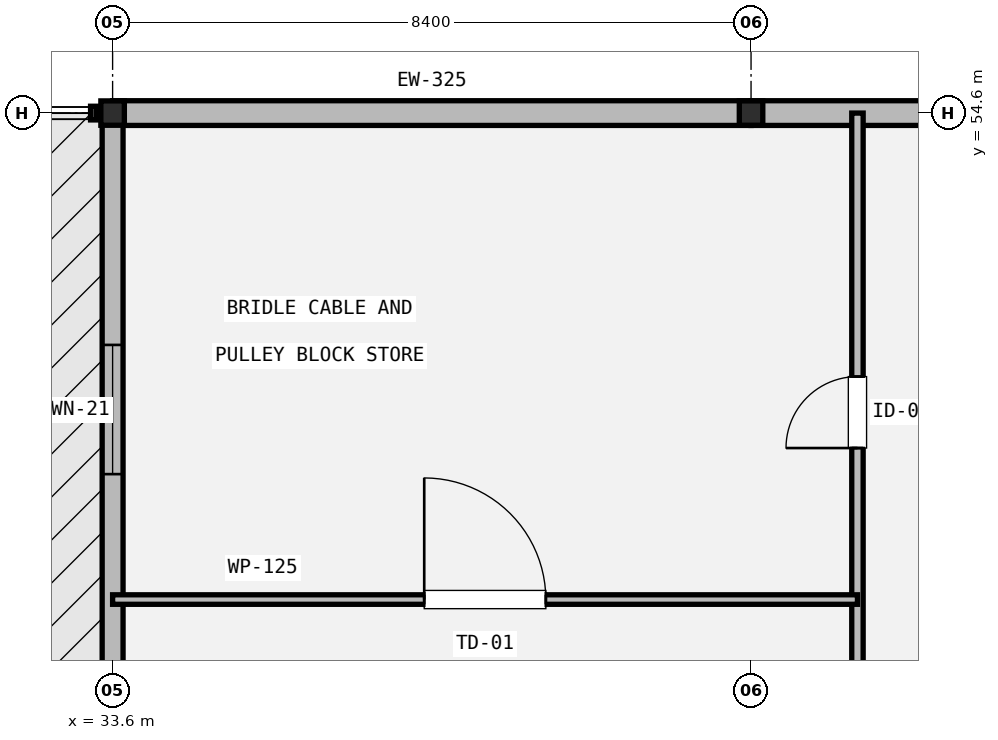
"""IFC4 building model, lengths in metres.
Left out: names, types, materials, properties, quantities, classifications, styles, units other than length and angle.
Written with IfcOpenShell. Run it as: python <this file> out.ifc"""

import sys

from ifc_helpers import new_model, si_unit, direction, frame, frame_2d, origin, origin_2d, place, context, subcontext, project, spatial, rectangle, i_section, extrude, element, fill, save


model = new_model("IFC4")
c1 = context("Model", 3, precision=1e-05, world=origin(), true_north=direction((0.0, 1.0)))
c2 = subcontext(c1, "Body", "Model", "MODEL_VIEW")
j1 = project(units=[si_unit("LENGTHUNIT", "METRE"), si_unit("PLANEANGLEUNIT", "RADIAN")], contexts=[c1])
p1 = place(None, origin())
s1 = spatial("IfcSite", under=j1, at=p1, CompositionType="ELEMENT")
p2 = place(p1, origin())
s2 = spatial("IfcBuilding", under=s1, at=p2, CompositionType="ELEMENT")
p3 = place(p2, frame((0.0, 0.0, 27.6)))
s3 = spatial("IfcBuildingStorey", under=s2, at=p3, CompositionType="ELEMENT", Elevation=27.6)
for number, where, z_axis, x_axis in (
    (1, (33.6, 54.6, 0.0), (0.0, 0.0, 1.0), (1.0, 0.0, 0.0)),
    (2, (42.0, 54.6, 0.0), (0.0, 0.0, 1.0), (1.0, 0.0, 0.0)),
):
    element("IfcColumn", number, at=place(p3, frame(where, z_axis=z_axis, x_axis=x_axis)), inside=s3, PredefinedType="COLUMN", context=c2, shape_type="SweptSolid", body=[
        extrude(i_section(OverallWidth=0.309, OverallDepth=0.321, WebThickness=0.014, FlangeThickness=0.022, FilletRadius=0.015, at=origin_2d()), origin(), (0.0, 0.0, 1.0), 4.8),
    ])
for number, where, z_axis, x_axis in (
    (3, (33.6, 54.6, 0.0), (0.0, 0.0, 1.0), (1.0, 0.0, 0.0)),
    (4, (42.0, 54.6, 0.0), (0.0, 0.0, 1.0), (1.0, 0.0, 0.0)),
):
    element("IfcWall", number, at=place(p3, frame(where, z_axis=z_axis, x_axis=x_axis)), inside=s3, PredefinedType="STANDARD", context=c2, shape_type="SweptSolid", body=[
        extrude(rectangle(XDim=8.4, YDim=0.325, at=frame_2d((4.2, 0.0))), origin(), (0.0, 0.0, 1.0), 4.552),
    ])
p4 = place(p3, frame((33.6, 39.0, 0.0), z_axis=(0.0, 0.0, 1.0), x_axis=(0.0, 1.0, 0.0)))
e5 = element("IfcWall", 5, at=p4, inside=s3, PredefinedType="STANDARD", context=c2, shape_type="SweptSolid", body=[
    extrude(rectangle(XDim=15.6, YDim=0.275, at=frame_2d((7.8, 0.0))), origin(), (0.0, 0.0, 1.0), 4.552),
])
p5 = place(p4, frame((3.125, 0.0, 0.9)))
e6 = element("IfcOpeningElement", 6, at=p5, cuts=e5, PredefinedType="OPENING", context=c2, shape_type="SweptSolid", body=[
    extrude(rectangle(XDim=1.55, YDim=1.6, at=frame_2d((0.775, 0.8))), frame((0.0, 0.147, 0.0), z_axis=(0.0, -1.0, 0.0), x_axis=(1.0, 0.0, 0.0)), (0.0, 0.0, 1.0), 0.295),
])
p6 = place(p4, frame((10.85, 0.0, 0.9)))
e7 = element("IfcOpeningElement", 7, at=p6, cuts=e5, PredefinedType="OPENING", context=c2, shape_type="SweptSolid", body=[
    extrude(rectangle(XDim=1.7, YDim=1.6, at=frame_2d((0.85, 0.8))), frame((0.0, 0.147, 0.0), z_axis=(0.0, -1.0, 0.0), x_axis=(1.0, 0.0, 0.0)), (0.0, 0.0, 1.0), 0.295),
])
p7 = place(p3, frame((43.4, 34.4, 0.0), z_axis=(0.0, 0.0, 1.0), x_axis=(0.0, 1.0, 0.0)))
e8 = element("IfcWall", 8, at=p7, inside=s3, PredefinedType="PARTITIONING", context=c2, shape_type="SweptSolid", body=[
    extrude(rectangle(XDim=20.2, YDim=0.15, at=frame_2d((10.1, 0.0))), origin(), (0.0, 0.0, 1.0), 4.552),
])
p8 = place(p7, frame((5.73, 0.0, 0.0)))
e9 = element("IfcOpeningElement", 9, at=p8, cuts=e8, PredefinedType="OPENING", context=c2, shape_type="SweptSolid", body=[
    extrude(rectangle(XDim=1.1, YDim=2.15, at=frame_2d((0.55, 1.075))), frame((0.0, 0.085, 0.0), z_axis=(0.0, -1.0, 0.0), x_axis=(1.0, 0.0, 0.0)), (0.0, 0.0, 1.0), 0.17),
])
p9 = place(p7, frame((15.793, 0.0, 0.0)))
e10 = element("IfcOpeningElement", 10, at=p9, cuts=e8, PredefinedType="OPENING", context=c2, shape_type="SweptSolid", body=[
    extrude(rectangle(XDim=0.94, YDim=2.1, at=frame_2d((0.47, 1.05))), frame((0.0, 0.085, 0.0), z_axis=(0.0, -1.0, 0.0), x_axis=(1.0, 0.0, 0.0)), (0.0, 0.0, 1.0), 0.17),
])
p10 = place(p3, frame((33.6, 48.2, 0.0), z_axis=(0.0, 0.0, 1.0), x_axis=(1.0, 0.0, 0.0)))
e11 = element("IfcWall", 11, at=p10, inside=s3, PredefinedType="PARTITIONING", context=c2, shape_type="SweptSolid", body=[
    extrude(rectangle(XDim=9.8, YDim=0.125, at=frame_2d((4.9, 0.0))), origin(), (0.0, 0.0, 1.0), 4.552),
])
p11 = place(p10, frame((4.1, 0.0, 0.0)))
e12 = element("IfcOpeningElement", 12, at=p11, cuts=e11, PredefinedType="OPENING", context=c2, shape_type="SweptSolid", body=[
    extrude(rectangle(XDim=1.6, YDim=1.4, at=frame_2d((0.8, 0.7))), frame((0.0, 0.073, 0.0), z_axis=(0.0, -1.0, 0.0), x_axis=(1.0, 0.0, 0.0)), (0.0, 0.0, 1.0), 0.145),
])
p12 = place(p6, origin())
e13 = element("IfcWindow", 13, at=p12, inside=s3, PartitioningType="SINGLE_PANEL", PredefinedType="WINDOW", context=c2, shape_type="SweptSolid", body=[
    extrude(rectangle(XDim=1.7, YDim=1.6, at=frame_2d((0.85, 0.8))), frame((0.0, 0.03, 0.0), z_axis=(0.0, -1.0, 0.0), x_axis=(1.0, 0.0, 0.0)), (0.0, 0.0, 1.0), 0.06),
])
fill(e7, e13)
p13 = place(p9, origin())
e14 = element("IfcDoor", 14, at=p13, inside=s3, OperationType="SINGLE_SWING_LEFT", PredefinedType="DOOR", context=c2, shape_type="SweptSolid", body=[
    extrude(rectangle(XDim=0.94, YDim=2.1, at=frame_2d((0.47, 1.05))), frame((0.0, 0.025, 0.0), z_axis=(0.0, -1.0, 0.0), x_axis=(1.0, 0.0, 0.0)), (0.0, 0.0, 1.0), 0.05),
])
fill(e10, e14)
p14 = place(p11, origin())
e15 = element("IfcDoor", 15, at=p14, inside=s3, OperationType="SWING_FIXED_LEFT", PredefinedType="TRAPDOOR", context=c2, shape_type="SweptSolid", body=[
    extrude(rectangle(XDim=1.6, YDim=1.4, at=frame_2d((0.8, 0.7))), frame((0.0, 0.025, 0.0), z_axis=(0.0, -1.0, 0.0), x_axis=(1.0, 0.0, 0.0)), (0.0, 0.0, 1.0), 0.05),
])
fill(e12, e15)
save(model, sys.argv[1])
